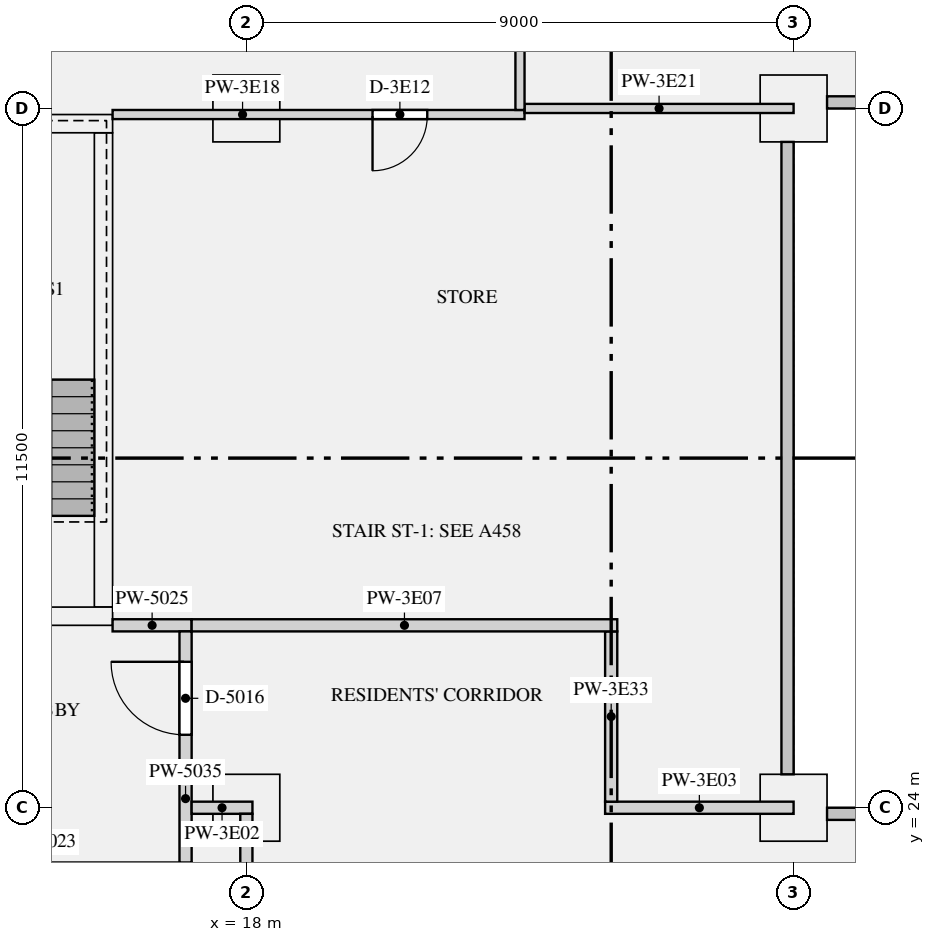
"""IFC4 building model, lengths in metres.
Left out: names, types, materials, properties, quantities, classifications, styles, units other than length and angle.
Written with IfcOpenShell. Run it as: python <this file> out.ifc"""

import sys

from ifc_helpers import new_model, si_unit, direction, frame, frame_2d, origin, origin_2d, place, context, subcontext, project, spatial, rectangle, extrude, element, fill, save


model = new_model("IFC4")
c1 = context("Model", 3, precision=1e-05, world=origin(), true_north=direction((0.0, 1.0)))
c2 = subcontext(c1, "Body", "Model", "MODEL_VIEW")
j1 = project(units=[si_unit("LENGTHUNIT", "METRE"), si_unit("PLANEANGLEUNIT", "RADIAN")], contexts=[c1])
p1 = place(None, origin())
s1 = spatial("IfcSite", under=j1, at=p1, CompositionType="ELEMENT")
p2 = place(p1, origin())
s2 = spatial("IfcBuilding", under=s1, at=p2, CompositionType="ELEMENT")
p3 = place(p2, frame((0.0, 0.0, 172.8)))
s3 = spatial("IfcBuildingStorey", under=s2, at=p3, CompositionType="ELEMENT", Elevation=172.8)
for number, where, z_axis, x_axis in (
    (1, (18.0, 24.0, 0.0), (0.0, 0.0, 1.0), (1.0, 0.0, 0.0)),
    (2, (27.0, 24.0, 0.0), (0.0, 0.0, 1.0), (1.0, 0.0, 0.0)),
    (3, (18.0, 35.5, 0.0), (0.0, 0.0, 1.0), (1.0, 0.0, 0.0)),
    (4, (27.0, 35.5, 0.0), (0.0, 0.0, 1.0), (1.0, 0.0, 0.0)),
):
    element("IfcColumn", number, at=place(p3, frame(where, z_axis=z_axis, x_axis=x_axis)), inside=s3, PredefinedType="COLUMN", context=c2, shape_type="SweptSolid", body=[
        extrude(rectangle(XDim=1.1, YDim=1.1, at=origin_2d()), origin(), (0.0, 0.0, 1.0), 3.15),
    ])
p4 = place(p3, frame((12.2, 27.15, 0.0), z_axis=(0.0, 0.0, 1.0), x_axis=(1.0, 0.0, 0.0)))
e5 = element("IfcWall", 5, at=p4, inside=s3, PredefinedType="SHEAR", context=c2, shape_type="SweptSolid", body=[
    extrude(rectangle(XDim=3.6, YDim=0.3, at=frame_2d((1.8, 0.0))), origin(), (0.0, 0.0, 1.0), 3.15),
])
p5 = place(p4, frame((1.25, 0.0, 0.0)))
e6 = element("IfcOpeningElement", 6, at=p5, cuts=e5, PredefinedType="OPENING", context=c2, shape_type="SweptSolid", body=[
    extrude(rectangle(XDim=1.1, YDim=2.1, at=frame_2d((0.55, 1.05))), frame((0.0, 0.16, 0.0), z_axis=(0.0, -1.0, 0.0), x_axis=(1.0, 0.0, 0.0)), (0.0, 0.0, 1.0), 0.32),
])
p6 = place(p3, frame((12.2, 35.25, 0.0), z_axis=(0.0, 0.0, 1.0), x_axis=(1.0, 0.0, 0.0)))
e7 = element("IfcWall", 7, at=p6, inside=s3, PredefinedType="SHEAR", context=c2, shape_type="SweptSolid", body=[
    extrude(rectangle(XDim=3.6, YDim=0.3, at=frame_2d((1.8, 0.0))), origin(), (0.0, 0.0, 1.0), 3.15),
])
p7 = place(p3, frame((15.65, 27.3, 0.0), z_axis=(0.0, 0.0, 1.0), x_axis=(0.0, 1.0, 0.0)))
e8 = element("IfcWall", 8, at=p7, inside=s3, PredefinedType="SHEAR", context=c2, shape_type="SweptSolid", body=[
    extrude(rectangle(XDim=7.8, YDim=0.3, at=frame_2d((3.9, 0.0))), origin(), (0.0, 0.0, 1.0), 3.15),
])
p8 = place(p3, frame((15.8, 27.0, 0.0), z_axis=(0.0, 0.0, 1.0), x_axis=(1.0, 0.0, 0.0)))
e9 = element("IfcWall", 9, at=p8, inside=s3, PredefinedType="PARTITIONING", context=c2, shape_type="SweptSolid", body=[
    extrude(rectangle(XDim=1.3, YDim=0.2, at=frame_2d((0.65, 0.0))), origin(), (0.0, 0.0, 1.0), 2.83),
])
p9 = place(p3, frame((17.0, 23.1, 0.0), z_axis=(0.0, 0.0, 1.0), x_axis=(0.0, 1.0, 0.0)))
e10 = element("IfcWall", 10, at=p9, inside=s3, PredefinedType="PARTITIONING", context=c2, shape_type="SweptSolid", body=[
    extrude(rectangle(XDim=3.8, YDim=0.2, at=frame_2d((1.9, 0.0))), origin(), (0.0, 0.0, 1.0), 2.83),
])
p10 = place(p9, frame((2.1, 0.0, 0.0)))
e11 = element("IfcOpeningElement", 11, at=p10, cuts=e10, PredefinedType="OPENING", context=c2, shape_type="SweptSolid", body=[
    extrude(rectangle(XDim=1.2, YDim=2.1, at=frame_2d((0.6, 1.05))), frame((0.0, 0.11, 0.0), z_axis=(0.0, -1.0, 0.0), x_axis=(1.0, 0.0, 0.0)), (0.0, 0.0, 1.0), 0.22),
])
p11 = place(p3, frame((17.1, 24.0, 0.0), z_axis=(0.0, 0.0, 1.0), x_axis=(1.0, 0.0, 0.0)))
e12 = element("IfcWall", 12, at=p11, inside=s3, PredefinedType="PARTITIONING", context=c2, shape_type="SweptSolid", body=[
    extrude(rectangle(XDim=1.0, YDim=0.2, at=frame_2d((0.5, 0.0))), origin(), (0.0, 0.0, 1.0), 2.83),
])
p12 = place(p3, frame((23.9, 24.0, 0.0), z_axis=(0.0, 0.0, 1.0), x_axis=(1.0, 0.0, 0.0)))
e13 = element("IfcWall", 13, at=p12, inside=s3, PredefinedType="PARTITIONING", context=c2, shape_type="SweptSolid", body=[
    extrude(rectangle(XDim=3.1, YDim=0.2, at=frame_2d((1.55, 0.0))), origin(), (0.0, 0.0, 1.0), 2.83),
])
p13 = place(p3, frame((17.1, 27.0, 0.0), z_axis=(0.0, 0.0, 1.0), x_axis=(1.0, 0.0, 0.0)))
e14 = element("IfcWall", 14, at=p13, inside=s3, PredefinedType="PARTITIONING", context=c2, shape_type="SweptSolid", body=[
    extrude(rectangle(XDim=7.0, YDim=0.2, at=frame_2d((3.5, 0.0))), origin(), (0.0, 0.0, 1.0), 2.83),
])
p14 = place(p3, frame((15.8, 35.4, 0.0), z_axis=(0.0, 0.0, 1.0), x_axis=(1.0, 0.0, 0.0)))
e15 = element("IfcWall", 15, at=p14, inside=s3, PredefinedType="PARTITIONING", context=c2, shape_type="SweptSolid", body=[
    extrude(rectangle(XDim=6.775, YDim=0.15, at=frame_2d((3.387, 0.0))), origin(), (0.0, 0.0, 1.0), 2.83),
])
p15 = place(p14, frame((4.275, 0.0, 0.0)))
e16 = element("IfcOpeningElement", 16, at=p15, cuts=e15, PredefinedType="OPENING", context=c2, shape_type="SweptSolid", body=[
    extrude(rectangle(XDim=0.9, YDim=2.1, at=frame_2d((0.45, 1.05))), frame((0.0, 0.085, 0.0), z_axis=(0.0, -1.0, 0.0), x_axis=(1.0, 0.0, 0.0)), (0.0, 0.0, 1.0), 0.17),
])
p16 = place(p3, frame((22.575, 35.5, 0.0), z_axis=(0.0, 0.0, 1.0), x_axis=(1.0, 0.0, 0.0)))
e17 = element("IfcWall", 17, at=p16, inside=s3, PredefinedType="PARTITIONING", context=c2, shape_type="SweptSolid", body=[
    extrude(rectangle(XDim=4.425, YDim=0.15, at=frame_2d((2.212, 0.0))), origin(), (0.0, 0.0, 1.0), 2.83),
])
p17 = place(p3, frame((18.0, 16.1, 0.0), z_axis=(0.0, 0.0, 1.0), x_axis=(0.0, 1.0, 0.0)))
e18 = element("IfcWall", 18, at=p17, inside=s3, PredefinedType="PARTITIONING", context=c2, shape_type="SweptSolid", body=[
    extrude(rectangle(XDim=7.8, YDim=0.2, at=frame_2d((3.9, 0.0))), origin(), (0.0, 0.0, 1.0), 2.83),
])
p18 = place(p17, frame((1.85, 0.0, 0.0)))
e19 = element("IfcOpeningElement", 19, at=p18, cuts=e18, PredefinedType="OPENING", context=c2, shape_type="SweptSolid", body=[
    extrude(rectangle(XDim=1.1, YDim=2.1, at=frame_2d((0.55, 1.05))), frame((0.0, 0.11, 0.0), z_axis=(0.0, -1.0, 0.0), x_axis=(1.0, 0.0, 0.0)), (0.0, 0.0, 1.0), 0.22),
])
p19 = place(p3, frame((24.0, 24.1, 0.0), z_axis=(0.0, 0.0, 1.0), x_axis=(0.0, 1.0, 0.0)))
e20 = element("IfcWall", 20, at=p19, inside=s3, PredefinedType="PARTITIONING", context=c2, shape_type="SweptSolid", body=[
    extrude(rectangle(XDim=2.8, YDim=0.2, at=frame_2d((1.4, 0.0))), origin(), (0.0, 0.0, 1.0), 2.83),
])
p20 = place(p3, frame((22.5, 35.475, 0.0), z_axis=(0.0, 0.0, 1.0), x_axis=(0.0, 1.0, 0.0)))
e21 = element("IfcWall", 21, at=p20, inside=s3, PredefinedType="PARTITIONING", context=c2, shape_type="SweptSolid", body=[
    extrude(rectangle(XDim=7.325, YDim=0.15, at=frame_2d((3.663, 0.0))), origin(), (0.0, 0.0, 1.0), 2.83),
])
p21 = place(p20, frame((3.0, 0.0, 0.0)))
e22 = element("IfcOpeningElement", 22, at=p21, cuts=e21, PredefinedType="OPENING", context=c2, shape_type="SweptSolid", body=[
    extrude(rectangle(XDim=1.5, YDim=2.1, at=frame_2d((0.75, 1.05))), frame((0.0, 0.085, 0.0), z_axis=(0.0, -1.0, 0.0), x_axis=(1.0, 0.0, 0.0)), (0.0, 0.0, 1.0), 0.17),
])
p22 = place(p10, origin())
e23 = element("IfcDoor", 23, at=p22, inside=s3, OperationType="SINGLE_SWING_RIGHT", PredefinedType="DOOR", context=c2, shape_type="SweptSolid", body=[
    extrude(rectangle(XDim=1.2, YDim=2.1, at=frame_2d((0.6, 1.05))), frame((0.0, 0.025, 0.0), z_axis=(0.0, -1.0, 0.0), x_axis=(1.0, 0.0, 0.0)), (0.0, 0.0, 1.0), 0.05),
])
fill(e11, e23)
p23 = place(p15, frame((0.9, 0.0, 0.0), z_axis=(0.0, 0.0, 1.0), x_axis=(-1.0, 0.0, 0.0)))
e24 = element("IfcDoor", 24, at=p23, inside=s3, OperationType="SINGLE_SWING_RIGHT", PredefinedType="DOOR", context=c2, shape_type="SweptSolid", body=[
    extrude(rectangle(XDim=0.9, YDim=2.1, at=frame_2d((0.45, 1.05))), frame((0.0, 0.025, 0.0), z_axis=(0.0, -1.0, 0.0), x_axis=(1.0, 0.0, 0.0)), (0.0, 0.0, 1.0), 0.05),
])
fill(e16, e24)
save(model, sys.argv[1])
